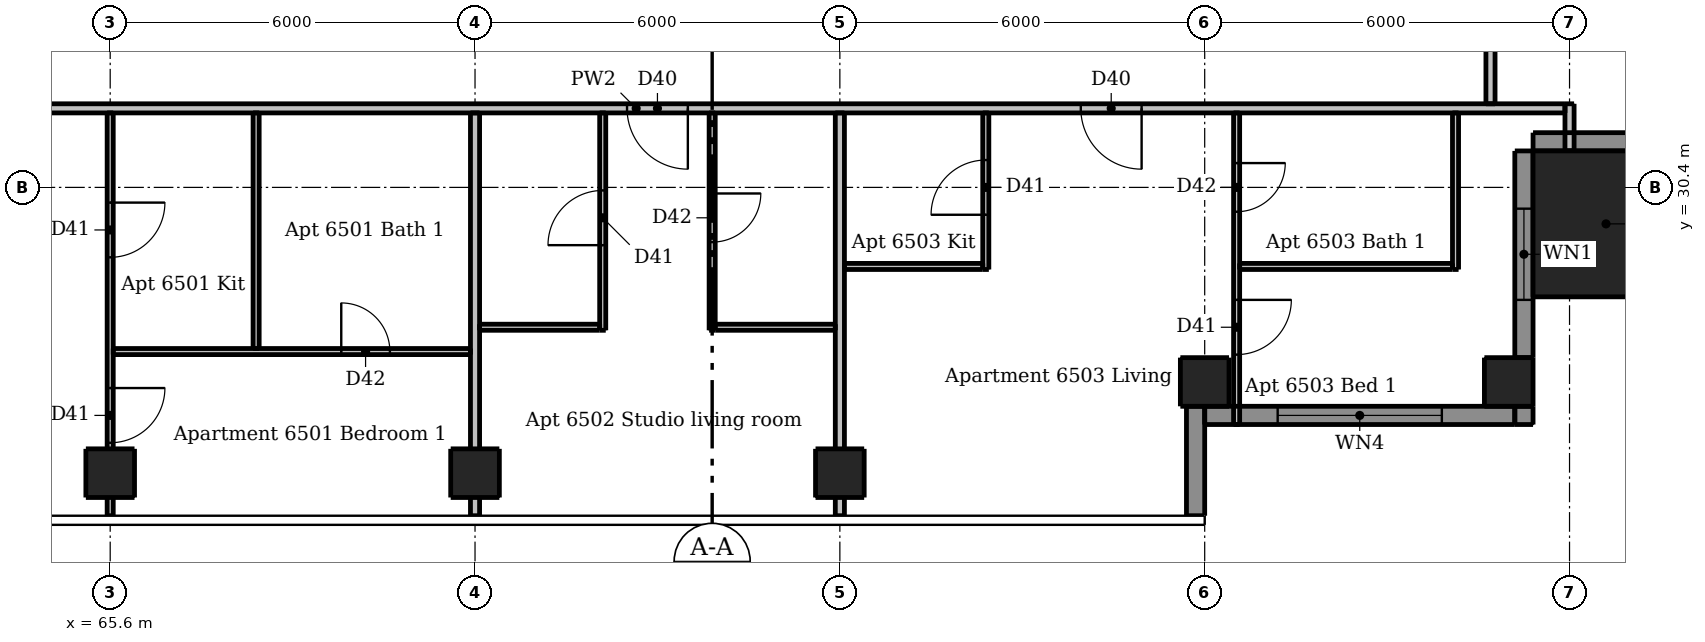
"""IFC4 building model, lengths in metres.
Left out: names, types, materials, properties, quantities, classifications, styles, units other than length and angle.
Written with IfcOpenShell. Run it as: python <this file> out.ifc"""

import sys

from ifc_helpers import new_model, si_unit, direction, frame, frame_2d, origin, origin_2d, place, context, subcontext, project, spatial, rectangle, extrude, element, fill, save


model = new_model("IFC4")
c1 = context("Model", 3, precision=1e-05, world=origin(), true_north=direction((0.0, 1.0)))
c2 = subcontext(c1, "Body", "Model", "MODEL_VIEW")
j1 = project(units=[si_unit("LENGTHUNIT", "METRE"), si_unit("PLANEANGLEUNIT", "RADIAN")], contexts=[c1])
p1 = place(None, origin())
s1 = spatial("IfcSite", under=j1, at=p1, CompositionType="ELEMENT")
p2 = place(p1, origin())
s2 = spatial("IfcBuilding", under=s1, at=p2, CompositionType="ELEMENT")
p3 = place(p2, frame((0.0, 0.0, 245.5)))
s3 = spatial("IfcBuildingStorey", under=s2, at=p3, CompositionType="ELEMENT", Elevation=245.5)
for number, where, z_axis, x_axis in (
    (1, (65.6, 25.7, 0.0), (0.0, 0.0, 1.0), (1.0, 0.0, 0.0)),
    (2, (71.6, 25.7, 0.0), (0.0, 0.0, 1.0), (1.0, 0.0, 0.0)),
    (3, (77.6, 25.7, 0.0), (0.0, 0.0, 1.0), (1.0, 0.0, 0.0)),
    (4, (83.6, 27.2, 0.0), (0.0, 0.0, 1.0), (1.0, 0.0, 0.0)),
    (5, (88.6, 27.2, 0.0), (0.0, 0.0, 1.0), (1.0, 0.0, 0.0)),
):
    element("IfcColumn", number, at=place(p3, frame(where, z_axis=z_axis, x_axis=x_axis)), inside=s3, PredefinedType="COLUMN", context=c2, shape_type="SweptSolid", body=[
        extrude(rectangle(XDim=0.8, YDim=0.8, at=origin_2d()), origin(), (0.0, 0.0, 1.0), 3.05),
    ])
p4 = place(p3, frame((90.2, 29.8, 0.0), z_axis=(0.0, 0.0, 1.0), x_axis=(1.0, 0.0, 0.0)))
e6 = element("IfcColumn", 6, at=p4, inside=s3, PredefinedType="COLUMN", context=c2, shape_type="SweptSolid", body=[
    extrude(rectangle(XDim=2.4, YDim=2.4, at=origin_2d()), origin(), (0.0, 0.0, 1.0), 3.3),
])
p5 = place(p3, frame((83.45, 25.0, 0.0), z_axis=(0.0, 0.0, 1.0), x_axis=(0.0, 1.0, 0.0)))
e7 = element("IfcWall", 7, at=p5, inside=s3, PredefinedType="SOLIDWALL", context=c2, shape_type="SweptSolid", body=[
    extrude(rectangle(XDim=1.8, YDim=0.3, at=frame_2d((0.9, 0.0))), origin(), (0.0, 0.0, 1.0), 3.05),
])
p6 = place(p3, frame((88.85, 26.5, 0.0), z_axis=(0.0, 0.0, 1.0), x_axis=(0.0, 1.0, 0.0)))
e8 = element("IfcWall", 8, at=p6, inside=s3, PredefinedType="SOLIDWALL", context=c2, shape_type="SweptSolid", body=[
    extrude(rectangle(XDim=0.3, YDim=0.3, at=frame_2d((0.15, 0.0))), origin(), (0.0, 0.0, 1.0), 3.05),
])
p7 = place(p3, frame((88.85, 27.6, 0.0), z_axis=(0.0, 0.0, 1.0), x_axis=(0.0, 1.0, 0.0)))
e9 = element("IfcWall", 9, at=p7, inside=s3, PredefinedType="SOLIDWALL", context=c2, shape_type="SweptSolid", body=[
    extrude(rectangle(XDim=3.4, YDim=0.3, at=frame_2d((1.7, 0.0))), origin(), (0.0, 0.0, 1.0), 3.05),
])
p8 = place(p7, frame((0.95, 0.0, 0.9)))
e10 = element("IfcOpeningElement", 10, at=p8, cuts=e9, PredefinedType="OPENING", context=c2, shape_type="SweptSolid", body=[
    extrude(rectangle(XDim=1.5, YDim=1.5, at=frame_2d((0.75, 0.75))), frame((0.0, 0.16, 0.0), z_axis=(0.0, -1.0, 0.0), x_axis=(1.0, 0.0, 0.0)), (0.0, 0.0, 1.0), 0.32),
])
p9 = place(p3, frame((89.0, 31.15, 0.0), z_axis=(0.0, 0.0, 1.0), x_axis=(1.0, 0.0, 0.0)))
e11 = element("IfcWall", 11, at=p9, inside=s3, PredefinedType="SOLIDWALL", context=c2, shape_type="SweptSolid", body=[
    extrude(rectangle(XDim=3.4, YDim=0.3, at=frame_2d((1.7, 0.0))), origin(), (0.0, 0.0, 1.0), 3.05),
])
p10 = place(p3, frame((83.6, 26.65, 0.0), z_axis=(0.0, 0.0, 1.0), x_axis=(1.0, 0.0, 0.0)))
e12 = element("IfcWall", 12, at=p10, inside=s3, PredefinedType="SOLIDWALL", context=c2, shape_type="SweptSolid", body=[
    extrude(rectangle(XDim=5.1, YDim=0.3, at=frame_2d((2.55, 0.0))), origin(), (0.0, 0.0, 1.0), 3.05),
])
p11 = place(p10, frame((1.2, 0.0, 0.15)))
e13 = element("IfcOpeningElement", 13, at=p11, cuts=e12, PredefinedType="OPENING", context=c2, shape_type="SweptSolid", body=[
    extrude(rectangle(XDim=2.7, YDim=2.1, at=frame_2d((1.35, 1.05))), frame((0.0, 0.16, 0.0), z_axis=(0.0, -1.0, 0.0), x_axis=(1.0, 0.0, 0.0)), (0.0, 0.0, 1.0), 0.32),
])
p12 = place(p3, frame((65.6, 31.625, 0.0), z_axis=(0.0, 0.0, 1.0), x_axis=(0.0, -1.0, 0.0)))
e14 = element("IfcWall", 14, at=p12, inside=s3, PredefinedType="PARTITIONING", context=c2, shape_type="SweptSolid", body=[
    extrude(rectangle(XDim=6.625, YDim=0.1, at=frame_2d((3.312, 0.0))), origin(), (0.0, 0.0, 1.0), 2.59),
])
p13 = place(p12, frame((1.475, 0.0, 0.0)))
e15 = element("IfcOpeningElement", 15, at=p13, cuts=e14, PredefinedType="OPENING", context=c2, shape_type="SweptSolid", body=[
    extrude(rectangle(XDim=0.9, YDim=2.1, at=frame_2d((0.45, 1.05))), frame((0.0, 0.06, 0.0), z_axis=(0.0, -1.0, 0.0), x_axis=(1.0, 0.0, 0.0)), (0.0, 0.0, 1.0), 0.12),
])
p14 = place(p12, frame((4.525, 0.0, 0.0)))
e16 = element("IfcOpeningElement", 16, at=p14, cuts=e14, PredefinedType="OPENING", context=c2, shape_type="SweptSolid", body=[
    extrude(rectangle(XDim=0.9, YDim=2.1, at=frame_2d((0.45, 1.05))), frame((0.0, 0.06, 0.0), z_axis=(0.0, -1.0, 0.0), x_axis=(1.0, 0.0, 0.0)), (0.0, 0.0, 1.0), 0.12),
])
p15 = place(p3, frame((68.0, 27.75, 0.0), z_axis=(0.0, 0.0, 1.0), x_axis=(0.0, 1.0, 0.0)))
e17 = element("IfcWall", 17, at=p15, inside=s3, PredefinedType="PARTITIONING", context=c2, shape_type="SweptSolid", body=[
    extrude(rectangle(XDim=3.875, YDim=0.1, at=frame_2d((1.938, 0.0))), origin(), (0.0, 0.0, 1.0), 3.05),
])
p16 = place(p3, frame((73.7, 28.05, 0.0), z_axis=(0.0, 0.0, 1.0), x_axis=(0.0, 1.0, 0.0)))
e18 = element("IfcWall", 18, at=p16, inside=s3, PredefinedType="PARTITIONING", context=c2, shape_type="SweptSolid", body=[
    extrude(rectangle(XDim=3.575, YDim=0.1, at=frame_2d((1.788, 0.0))), origin(), (0.0, 0.0, 1.0), 3.05),
])
p17 = place(p16, frame((1.4, 0.0, 0.0)))
e19 = element("IfcOpeningElement", 19, at=p17, cuts=e18, PredefinedType="OPENING", context=c2, shape_type="SweptSolid", body=[
    extrude(rectangle(XDim=0.9, YDim=2.1, at=frame_2d((0.45, 1.05))), frame((0.0, 0.06, 0.0), z_axis=(0.0, -1.0, 0.0), x_axis=(1.0, 0.0, 0.0)), (0.0, 0.0, 1.0), 0.12),
])
p18 = place(p3, frame((75.5, 31.625, 0.0), z_axis=(0.0, 0.0, 1.0), x_axis=(0.0, -1.0, 0.0)))
e20 = element("IfcWall", 20, at=p18, inside=s3, PredefinedType="PARTITIONING", context=c2, shape_type="SweptSolid", body=[
    extrude(rectangle(XDim=3.575, YDim=0.1, at=frame_2d((1.788, 0.0))), origin(), (0.0, 0.0, 1.0), 3.05),
])
p19 = place(p18, frame((1.325, 0.0, 0.0)))
e21 = element("IfcOpeningElement", 21, at=p19, cuts=e20, PredefinedType="OPENING", context=c2, shape_type="SweptSolid", body=[
    extrude(rectangle(XDim=0.8, YDim=2.1, at=frame_2d((0.4, 1.05))), frame((0.0, 0.06, 0.0), z_axis=(0.0, -1.0, 0.0), x_axis=(1.0, 0.0, 0.0)), (0.0, 0.0, 1.0), 0.12),
])
p20 = place(p3, frame((80.0, 29.05, 0.0), z_axis=(0.0, 0.0, 1.0), x_axis=(0.0, 1.0, 0.0)))
e22 = element("IfcWall", 22, at=p20, inside=s3, PredefinedType="PARTITIONING", context=c2, shape_type="SweptSolid", body=[
    extrude(rectangle(XDim=2.575, YDim=0.1, at=frame_2d((1.288, 0.0))), origin(), (0.0, 0.0, 1.0), 3.05),
])
p21 = place(p20, frame((0.9, 0.0, 0.0)))
e23 = element("IfcOpeningElement", 23, at=p21, cuts=e22, PredefinedType="OPENING", context=c2, shape_type="SweptSolid", body=[
    extrude(rectangle(XDim=0.9, YDim=2.1, at=frame_2d((0.45, 1.05))), frame((0.0, 0.06, 0.0), z_axis=(0.0, -1.0, 0.0), x_axis=(1.0, 0.0, 0.0)), (0.0, 0.0, 1.0), 0.12),
])
p22 = place(p3, frame((84.125, 31.625, 0.0), z_axis=(0.0, 0.0, 1.0), x_axis=(0.0, -1.0, 0.0)))
e24 = element("IfcWall", 24, at=p22, inside=s3, PredefinedType="PARTITIONING", context=c2, shape_type="SweptSolid", body=[
    extrude(rectangle(XDim=5.125, YDim=0.1, at=frame_2d((2.562, 0.0))), origin(), (0.0, 0.0, 1.0), 3.05),
])
p23 = place(p22, frame((3.075, 0.0, 0.0)))
e25 = element("IfcOpeningElement", 25, at=p23, cuts=e24, PredefinedType="OPENING", context=c2, shape_type="SweptSolid", body=[
    extrude(rectangle(XDim=0.9, YDim=2.1, at=frame_2d((0.45, 1.05))), frame((0.0, 0.06, 0.0), z_axis=(0.0, -1.0, 0.0), x_axis=(1.0, 0.0, 0.0)), (0.0, 0.0, 1.0), 0.12),
])
p24 = place(p22, frame((0.825, 0.0, 0.0)))
e26 = element("IfcOpeningElement", 26, at=p24, cuts=e24, PredefinedType="OPENING", context=c2, shape_type="SweptSolid", body=[
    extrude(rectangle(XDim=0.8, YDim=2.1, at=frame_2d((0.4, 1.05))), frame((0.0, 0.06, 0.0), z_axis=(0.0, -1.0, 0.0), x_axis=(1.0, 0.0, 0.0)), (0.0, 0.0, 1.0), 0.12),
])
p25 = place(p3, frame((87.725, 29.05, 0.0), z_axis=(0.0, 0.0, 1.0), x_axis=(0.0, 1.0, 0.0)))
e27 = element("IfcWall", 27, at=p25, inside=s3, PredefinedType="PARTITIONING", context=c2, shape_type="SweptSolid", body=[
    extrude(rectangle(XDim=2.575, YDim=0.1, at=frame_2d((1.288, 0.0))), origin(), (0.0, 0.0, 1.0), 3.05),
])
p26 = place(p3, frame((77.675, 29.1, 0.0), z_axis=(0.0, 0.0, 1.0), x_axis=(1.0, 0.0, 0.0)))
e28 = element("IfcWall", 28, at=p26, inside=s3, PredefinedType="PARTITIONING", context=c2, shape_type="SweptSolid", body=[
    extrude(rectangle(XDim=2.275, YDim=0.1, at=frame_2d((1.137, 0.0))), origin(), (0.0, 0.0, 1.0), 3.05),
])
p27 = place(p3, frame((84.175, 29.1, 0.0), z_axis=(0.0, 0.0, 1.0), x_axis=(1.0, 0.0, 0.0)))
e29 = element("IfcWall", 29, at=p27, inside=s3, PredefinedType="PARTITIONING", context=c2, shape_type="SweptSolid", body=[
    extrude(rectangle(XDim=3.5, YDim=0.1, at=frame_2d((1.75, 0.0))), origin(), (0.0, 0.0, 1.0), 3.05),
])
for number, where, z_axis, x_axis in (
    (30, (71.675, 28.1, 0.0), (0.0, 0.0, 1.0), (1.0, 0.0, 0.0)),
    (31, (75.55, 28.1, 0.0), (0.0, 0.0, 1.0), (1.0, 0.0, 0.0)),
):
    element("IfcWall", number, at=place(p3, frame(where, z_axis=z_axis, x_axis=x_axis)), inside=s3, PredefinedType="PARTITIONING", context=c2, shape_type="SweptSolid", body=[
        extrude(rectangle(XDim=1.975, YDim=0.1, at=frame_2d((0.987, 0.0))), origin(), (0.0, 0.0, 1.0), 3.05),
    ])
p28 = place(p3, frame((65.65, 27.7, 0.0), z_axis=(0.0, 0.0, 1.0), x_axis=(1.0, 0.0, 0.0)))
e32 = element("IfcWall", 32, at=p28, inside=s3, PredefinedType="PARTITIONING", context=c2, shape_type="SweptSolid", body=[
    extrude(rectangle(XDim=5.875, YDim=0.1, at=frame_2d((2.938, 0.0))), origin(), (0.0, 0.0, 1.0), 3.05),
])
p29 = place(p28, frame((3.75, 0.0, 0.0)))
e33 = element("IfcOpeningElement", 33, at=p29, cuts=e32, PredefinedType="OPENING", context=c2, shape_type="SweptSolid", body=[
    extrude(rectangle(XDim=0.8, YDim=2.1, at=frame_2d((0.4, 1.05))), frame((0.0, 0.06, 0.0), z_axis=(0.0, -1.0, 0.0), x_axis=(1.0, 0.0, 0.0)), (0.0, 0.0, 1.0), 0.12),
])
for number, where, z_axis, x_axis in (
    (34, (71.6, 25.0, 0.0), (0.0, 0.0, 1.0), (0.0, 1.0, 0.0)),
    (35, (77.6, 25.0, 0.0), (0.0, 0.0, 1.0), (0.0, 1.0, 0.0)),
):
    element("IfcWall", number, at=place(p3, frame(where, z_axis=z_axis, x_axis=x_axis)), inside=s3, PredefinedType="PARTITIONING", context=c2, shape_type="SweptSolid", body=[
        extrude(rectangle(XDim=6.625, YDim=0.15, at=frame_2d((3.312, 0.0))), origin(), (0.0, 0.0, 1.0), 2.59),
    ])
p30 = place(p3, frame((88.3, 61.175, 0.0), z_axis=(0.0, 0.0, 1.0), x_axis=(0.0, -1.0, 0.0)))
e36 = element("IfcWall", 36, at=p30, inside=s3, PredefinedType="PARTITIONING", context=c2, shape_type="SweptSolid", body=[
    extrude(rectangle(XDim=29.4, YDim=0.15, at=frame_2d((14.7, 0.0))), origin(), (0.0, 0.0, 1.0), 3.05),
])
p31 = place(p30, frame((26.625, 0.0, 0.0)))
e37 = element("IfcOpeningElement", 37, at=p31, cuts=e36, PredefinedType="OPENING", context=c2, shape_type="SweptSolid", body=[
    extrude(rectangle(XDim=1.0, YDim=2.1, at=frame_2d((0.5, 1.05))), frame((0.0, 0.085, 0.0), z_axis=(0.0, -1.0, 0.0), x_axis=(1.0, 0.0, 0.0)), (0.0, 0.0, 1.0), 0.17),
])
p32 = place(p30, frame((15.275, 0.0, 0.0)))
e38 = element("IfcOpeningElement", 38, at=p32, cuts=e36, PredefinedType="OPENING", context=c2, shape_type="SweptSolid", body=[
    extrude(rectangle(XDim=1.0, YDim=2.1, at=frame_2d((0.5, 1.05))), frame((0.0, 0.085, 0.0), z_axis=(0.0, -1.0, 0.0), x_axis=(1.0, 0.0, 0.0)), (0.0, 0.0, 1.0), 0.17),
])
p33 = place(p30, frame((9.275, 0.0, 0.0)))
e39 = element("IfcOpeningElement", 39, at=p33, cuts=e36, PredefinedType="OPENING", context=c2, shape_type="SweptSolid", body=[
    extrude(rectangle(XDim=1.0, YDim=2.1, at=frame_2d((0.5, 1.05))), frame((0.0, 0.085, 0.0), z_axis=(0.0, -1.0, 0.0), x_axis=(1.0, 0.0, 0.0)), (0.0, 0.0, 1.0), 0.17),
])
p34 = place(p30, frame((3.275, 0.0, 0.0)))
e40 = element("IfcOpeningElement", 40, at=p34, cuts=e36, PredefinedType="OPENING", context=c2, shape_type="SweptSolid", body=[
    extrude(rectangle(XDim=1.0, YDim=2.1, at=frame_2d((0.5, 1.05))), frame((0.0, 0.085, 0.0), z_axis=(0.0, -1.0, 0.0), x_axis=(1.0, 0.0, 0.0)), (0.0, 0.0, 1.0), 0.17),
])
p35 = place(p3, frame((89.6, 31.0, 0.0), z_axis=(0.0, 0.0, 1.0), x_axis=(0.0, 1.0, 0.0)))
e41 = element("IfcWall", 41, at=p35, inside=s3, PredefinedType="PARTITIONING", context=c2, shape_type="SweptSolid", body=[
    extrude(rectangle(XDim=0.775, YDim=0.15, at=frame_2d((0.387, 0.0))), origin(), (0.0, 0.0, 1.0), 3.05),
])
p36 = place(p3, frame((89.525, 31.7, 0.0), z_axis=(0.0, 0.0, 1.0), x_axis=(-1.0, 0.0, 0.0)))
e42 = element("IfcWall", 42, at=p36, inside=s3, PredefinedType="PARTITIONING", context=c2, shape_type="SweptSolid", body=[
    extrude(rectangle(XDim=30.55, YDim=0.15, at=frame_2d((15.275, 0.0))), origin(), (0.0, 0.0, 1.0), 3.05),
])
p37 = place(p36, frame((26.775, 0.0, 0.0)))
e43 = element("IfcOpeningElement", 43, at=p37, cuts=e42, PredefinedType="OPENING", context=c2, shape_type="SweptSolid", body=[
    extrude(rectangle(XDim=1.0, YDim=2.1, at=frame_2d((0.5, 1.05))), frame((0.0, 0.085, 0.0), z_axis=(0.0, -1.0, 0.0), x_axis=(1.0, 0.0, 0.0)), (0.0, 0.0, 1.0), 0.17),
])
p38 = place(p36, frame((14.425, 0.0, 0.0)))
e44 = element("IfcOpeningElement", 44, at=p38, cuts=e42, PredefinedType="OPENING", context=c2, shape_type="SweptSolid", body=[
    extrude(rectangle(XDim=1.0, YDim=2.1, at=frame_2d((0.5, 1.05))), frame((0.0, 0.085, 0.0), z_axis=(0.0, -1.0, 0.0), x_axis=(1.0, 0.0, 0.0)), (0.0, 0.0, 1.0), 0.17),
])
p39 = place(p36, frame((6.962, 0.0, 0.0)))
e45 = element("IfcOpeningElement", 45, at=p39, cuts=e42, PredefinedType="OPENING", context=c2, shape_type="SweptSolid", body=[
    extrude(rectangle(XDim=1.0, YDim=2.1, at=frame_2d((0.5, 1.05))), frame((0.0, 0.085, 0.0), z_axis=(0.0, -1.0, 0.0), x_axis=(1.0, 0.0, 0.0)), (0.0, 0.0, 1.0), 0.17),
])
p40 = place(p8, origin())
e46 = element("IfcWindow", 46, at=p40, inside=s3, PartitioningType="DOUBLE_PANEL_VERTICAL", PredefinedType="WINDOW", context=c2, shape_type="SweptSolid", body=[
    extrude(rectangle(XDim=1.5, YDim=1.5, at=frame_2d((0.75, 0.75))), frame((0.0, 0.03, 0.0), z_axis=(0.0, -1.0, 0.0), x_axis=(1.0, 0.0, 0.0)), (0.0, 0.0, 1.0), 0.06),
])
fill(e10, e46)
p41 = place(p11, origin())
e47 = element("IfcWindow", 47, at=p41, inside=s3, PartitioningType="DOUBLE_PANEL_VERTICAL", PredefinedType="WINDOW", context=c2, shape_type="SweptSolid", body=[
    extrude(rectangle(XDim=2.7, YDim=2.1, at=frame_2d((1.35, 1.05))), frame((0.0, 0.03, 0.0), z_axis=(0.0, -1.0, 0.0), x_axis=(1.0, 0.0, 0.0)), (0.0, 0.0, 1.0), 0.06),
])
fill(e13, e47)
p42 = place(p13, origin())
e48 = element("IfcDoor", 48, at=p42, inside=s3, OperationType="SINGLE_SWING_LEFT", PredefinedType="DOOR", context=c2, shape_type="SweptSolid", body=[
    extrude(rectangle(XDim=0.9, YDim=2.1, at=frame_2d((0.45, 1.05))), frame((0.0, 0.025, 0.0), z_axis=(0.0, -1.0, 0.0), x_axis=(1.0, 0.0, 0.0)), (0.0, 0.0, 1.0), 0.05),
])
fill(e15, e48)
p43 = place(p14, origin())
e49 = element("IfcDoor", 49, at=p43, inside=s3, OperationType="SINGLE_SWING_LEFT", PredefinedType="DOOR", context=c2, shape_type="SweptSolid", body=[
    extrude(rectangle(XDim=0.9, YDim=2.1, at=frame_2d((0.45, 1.05))), frame((0.0, 0.025, 0.0), z_axis=(0.0, -1.0, 0.0), x_axis=(1.0, 0.0, 0.0)), (0.0, 0.0, 1.0), 0.05),
])
fill(e16, e49)
p44 = place(p29, origin())
e50 = element("IfcDoor", 50, at=p44, inside=s3, OperationType="SINGLE_SWING_LEFT", PredefinedType="DOOR", context=c2, shape_type="SweptSolid", body=[
    extrude(rectangle(XDim=0.8, YDim=2.1, at=frame_2d((0.4, 1.05))), frame((0.0, 0.025, 0.0), z_axis=(0.0, -1.0, 0.0), x_axis=(1.0, 0.0, 0.0)), (0.0, 0.0, 1.0), 0.05),
])
fill(e33, e50)
p45 = place(p38, origin())
e51 = element("IfcDoor", 51, at=p45, inside=s3, OperationType="SINGLE_SWING_LEFT", PredefinedType="DOOR", context=c2, shape_type="SweptSolid", body=[
    extrude(rectangle(XDim=1.0, YDim=2.1, at=frame_2d((0.5, 1.05))), frame((0.0, 0.025, 0.0), z_axis=(0.0, -1.0, 0.0), x_axis=(1.0, 0.0, 0.0)), (0.0, 0.0, 1.0), 0.05),
])
fill(e44, e51)
p46 = place(p17, origin())
e52 = element("IfcDoor", 52, at=p46, inside=s3, OperationType="SINGLE_SWING_LEFT", PredefinedType="DOOR", context=c2, shape_type="SweptSolid", body=[
    extrude(rectangle(XDim=0.9, YDim=2.1, at=frame_2d((0.45, 1.05))), frame((0.0, 0.025, 0.0), z_axis=(0.0, -1.0, 0.0), x_axis=(1.0, 0.0, 0.0)), (0.0, 0.0, 1.0), 0.05),
])
fill(e19, e52)
p47 = place(p19, origin())
e53 = element("IfcDoor", 53, at=p47, inside=s3, OperationType="SINGLE_SWING_LEFT", PredefinedType="DOOR", context=c2, shape_type="SweptSolid", body=[
    extrude(rectangle(XDim=0.8, YDim=2.1, at=frame_2d((0.4, 1.05))), frame((0.0, 0.025, 0.0), z_axis=(0.0, -1.0, 0.0), x_axis=(1.0, 0.0, 0.0)), (0.0, 0.0, 1.0), 0.05),
])
fill(e21, e53)
p48 = place(p39, origin())
e54 = element("IfcDoor", 54, at=p48, inside=s3, OperationType="SINGLE_SWING_LEFT", PredefinedType="DOOR", context=c2, shape_type="SweptSolid", body=[
    extrude(rectangle(XDim=1.0, YDim=2.1, at=frame_2d((0.5, 1.05))), frame((0.0, 0.025, 0.0), z_axis=(0.0, -1.0, 0.0), x_axis=(1.0, 0.0, 0.0)), (0.0, 0.0, 1.0), 0.05),
])
fill(e45, e54)
p49 = place(p21, origin())
e55 = element("IfcDoor", 55, at=p49, inside=s3, OperationType="SINGLE_SWING_LEFT", PredefinedType="DOOR", context=c2, shape_type="SweptSolid", body=[
    extrude(rectangle(XDim=0.9, YDim=2.1, at=frame_2d((0.45, 1.05))), frame((0.0, 0.025, 0.0), z_axis=(0.0, -1.0, 0.0), x_axis=(1.0, 0.0, 0.0)), (0.0, 0.0, 1.0), 0.05),
])
fill(e23, e55)
p50 = place(p23, origin())
e56 = element("IfcDoor", 56, at=p50, inside=s3, OperationType="SINGLE_SWING_LEFT", PredefinedType="DOOR", context=c2, shape_type="SweptSolid", body=[
    extrude(rectangle(XDim=0.9, YDim=2.1, at=frame_2d((0.45, 1.05))), frame((0.0, 0.025, 0.0), z_axis=(0.0, -1.0, 0.0), x_axis=(1.0, 0.0, 0.0)), (0.0, 0.0, 1.0), 0.05),
])
fill(e25, e56)
p51 = place(p24, origin())
e57 = element("IfcDoor", 57, at=p51, inside=s3, OperationType="SINGLE_SWING_LEFT", PredefinedType="DOOR", context=c2, shape_type="SweptSolid", body=[
    extrude(rectangle(XDim=0.8, YDim=2.1, at=frame_2d((0.4, 1.05))), frame((0.0, 0.025, 0.0), z_axis=(0.0, -1.0, 0.0), x_axis=(1.0, 0.0, 0.0)), (0.0, 0.0, 1.0), 0.05),
])
fill(e26, e57)
save(model, sys.argv[1])
